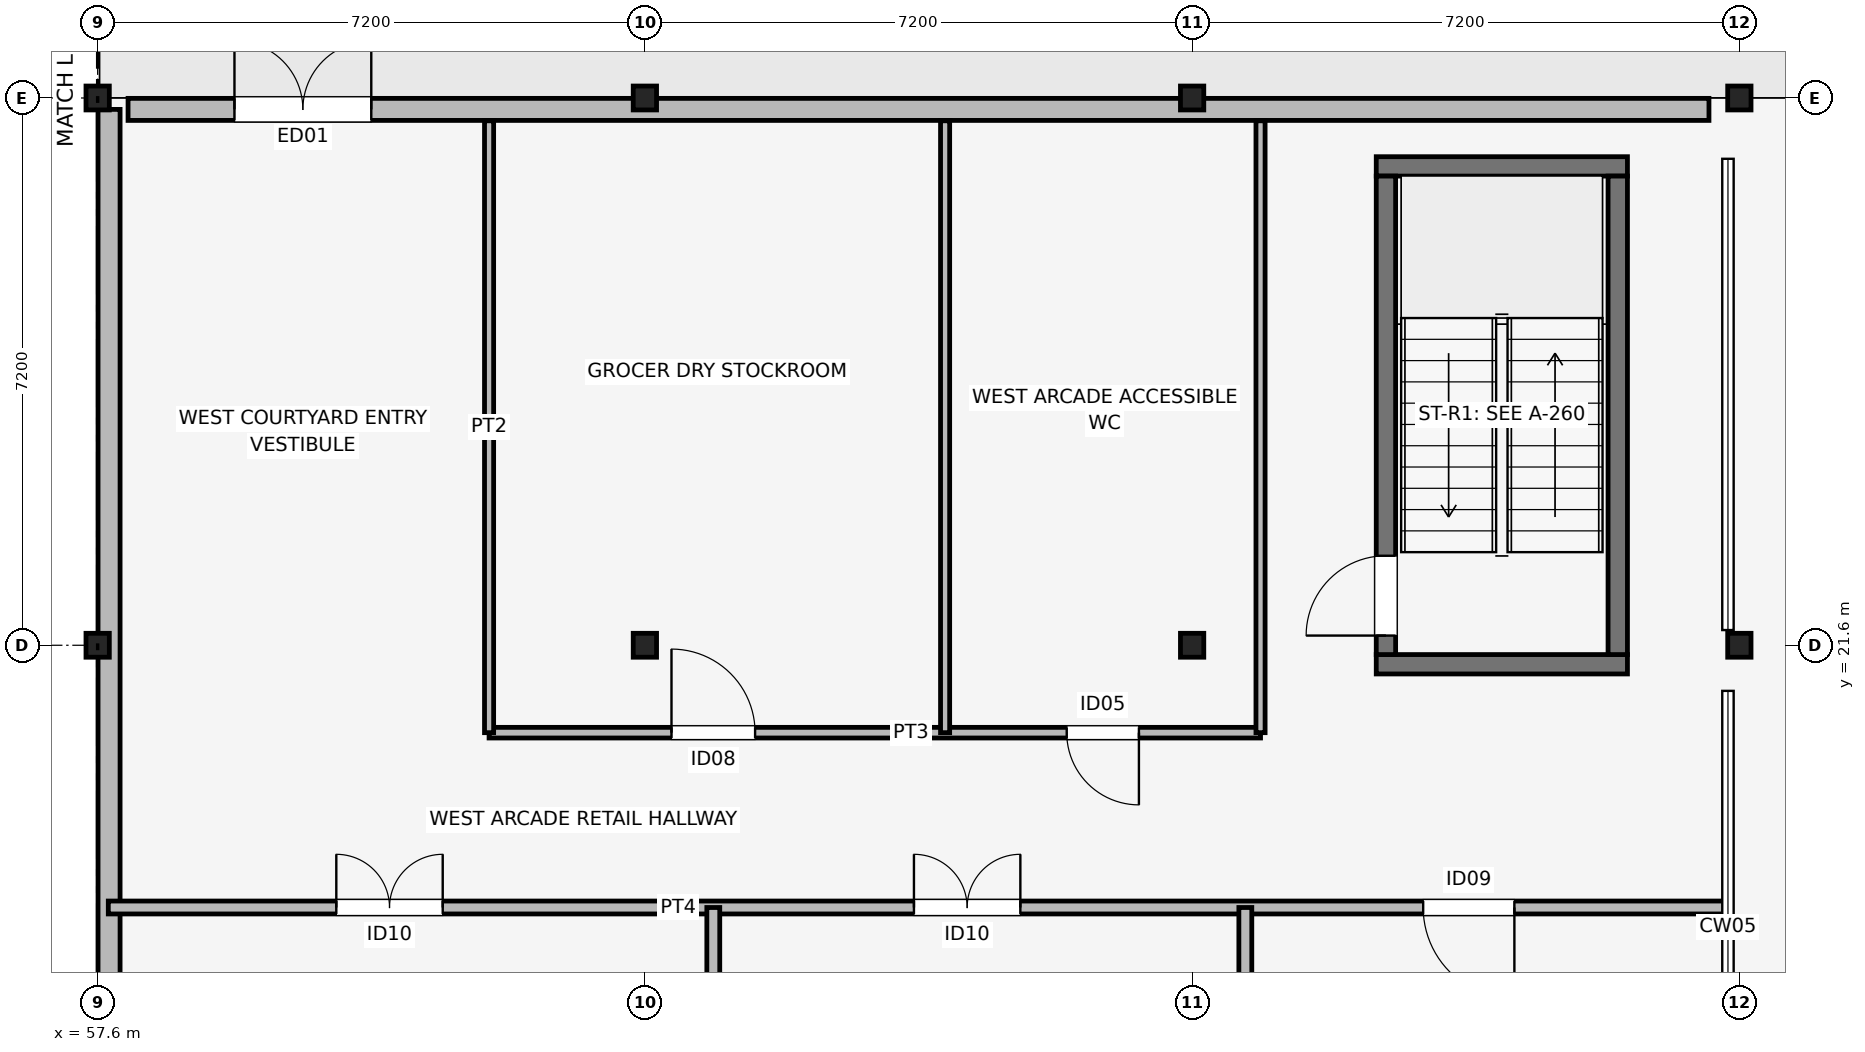
"""IFC4 building model, lengths in metres.
Left out: names, types, materials, properties, quantities, classifications, styles, units other than length and angle.
Written with IfcOpenShell. Run it as: python <this file> out.ifc"""

import sys

from ifc_helpers import new_model, si_unit, direction, frame, frame_2d, origin, origin_2d, place, context, subcontext, project, spatial, rectangle, i_section, extrude, element, fill, save


model = new_model("IFC4")
c1 = context("Model", 3, precision=1e-05, world=origin(), true_north=direction((0.0, 1.0)))
c2 = subcontext(c1, "Body", "Model", "MODEL_VIEW")
j1 = project(units=[si_unit("LENGTHUNIT", "METRE"), si_unit("PLANEANGLEUNIT", "RADIAN")], contexts=[c1])
p1 = place(None, origin())
s1 = spatial("IfcSite", under=j1, at=p1, CompositionType="ELEMENT")
p2 = place(p1, origin())
s2 = spatial("IfcBuilding", under=s1, at=p2, CompositionType="ELEMENT")
p3 = place(p2, origin())
s3 = spatial("IfcBuildingStorey", under=s2, at=p3, CompositionType="ELEMENT", Elevation=0.0)
for number, where, z_axis, x_axis in (
    (1, (57.6, 21.6, 0.0), (0.0, 0.0, 1.0), (1.0, 0.0, 0.0)),
    (2, (57.6, 28.8, 0.0), (0.0, 0.0, 1.0), (1.0, 0.0, 0.0)),
    (3, (64.8, 21.6, 0.0), (0.0, 0.0, 1.0), (1.0, 0.0, 0.0)),
    (4, (64.8, 28.8, 0.0), (0.0, 0.0, 1.0), (1.0, 0.0, 0.0)),
    (5, (72.0, 21.6, 0.0), (0.0, 0.0, 1.0), (1.0, 0.0, 0.0)),
    (6, (72.0, 28.8, 0.0), (0.0, 0.0, 1.0), (1.0, 0.0, 0.0)),
    (7, (79.2, 21.6, 0.0), (0.0, 0.0, 1.0), (1.0, 0.0, 0.0)),
    (8, (79.2, 28.8, 0.0), (0.0, 0.0, 1.0), (1.0, 0.0, 0.0)),
):
    element("IfcColumn", number, at=place(p3, frame(where, z_axis=z_axis, x_axis=x_axis)), inside=s3, PredefinedType="COLUMN", context=c2, shape_type="SweptSolid", body=[
        extrude(i_section(OverallWidth=0.307, OverallDepth=0.315, WebThickness=0.012, FlangeThickness=0.019, FilletRadius=0.017, at=origin_2d()), origin(), (0.0, 0.0, 1.0), 4.5),
    ])
for number, where, z_axis, x_axis in (
    (9, (74.423, 21.35, 0.0), (0.0, 0.0, 1.0), (1.0, 0.0, 0.0)),
    (10, (74.423, 27.9, 0.0), (0.0, 0.0, 1.0), (1.0, 0.0, 0.0)),
):
    element("IfcWall", number, at=place(p3, frame(where, z_axis=z_axis, x_axis=x_axis)), inside=s3, PredefinedType="SHEAR", context=c2, shape_type="SweptSolid", body=[
        extrude(rectangle(XDim=3.305, YDim=0.255, at=frame_2d((1.652, 0.0))), origin(), (0.0, 0.0, 1.0), 4.5),
    ])
p4 = place(p3, frame((74.55, 21.478, 0.0), z_axis=(0.0, 0.0, 1.0), x_axis=(0.0, 1.0, 0.0)))
e11 = element("IfcWall", 11, at=p4, inside=s3, PredefinedType="SHEAR", context=c2, shape_type="SweptSolid", body=[
    extrude(rectangle(XDim=6.295, YDim=0.255, at=frame_2d((3.147, 0.0))), origin(), (0.0, 0.0, 1.0), 4.5),
])
p5 = place(p4, frame((0.25, 0.0, 0.0)))
e12 = element("IfcOpeningElement", 12, at=p5, cuts=e11, PredefinedType="OPENING", context=c2, shape_type="SweptSolid", body=[
    extrude(rectangle(XDim=1.05, YDim=2.12, at=frame_2d((0.525, 1.06))), frame((0.0, 0.137, 0.0), z_axis=(0.0, -1.0, 0.0), x_axis=(1.0, 0.0, 0.0)), (0.0, 0.0, 1.0), 0.275),
])
p6 = place(p3, frame((77.6, 21.478, 0.0), z_axis=(0.0, 0.0, 1.0), x_axis=(0.0, 1.0, 0.0)))
e13 = element("IfcWall", 13, at=p6, inside=s3, PredefinedType="SHEAR", context=c2, shape_type="SweptSolid", body=[
    extrude(rectangle(XDim=6.295, YDim=0.255, at=frame_2d((3.147, 0.0))), origin(), (0.0, 0.0, 1.0), 4.5),
])
p7 = place(p3, frame((58.0, 28.65, 0.0), z_axis=(0.0, 0.0, 1.0), x_axis=(1.0, 0.0, 0.0)))
e14 = element("IfcWall", 14, at=p7, inside=s3, PredefinedType="SOLIDWALL", context=c2, shape_type="SweptSolid", body=[
    extrude(rectangle(XDim=20.8, YDim=0.29, at=frame_2d((10.4, 0.0))), origin(), (0.0, 0.0, 1.0), 3.701),
])
p8 = place(p7, frame((1.4, 0.0, 0.0)))
e15 = element("IfcOpeningElement", 15, at=p8, cuts=e14, PredefinedType="OPENING", context=c2, shape_type="SweptSolid", body=[
    extrude(rectangle(XDim=1.8, YDim=2.4, at=frame_2d((0.9, 1.2))), frame((0.0, 0.155, 0.0), z_axis=(0.0, -1.0, 0.0), x_axis=(1.0, 0.0, 0.0)), (0.0, 0.0, 1.0), 0.31),
])
p9 = place(p3, frame((57.75, 7.35, 0.0), z_axis=(0.0, 0.0, 1.0), x_axis=(0.0, 1.0, 0.0)))
e16 = element("IfcWall", 16, at=p9, inside=s3, PredefinedType="SOLIDWALL", context=c2, shape_type="SweptSolid", body=[
    extrude(rectangle(XDim=21.3, YDim=0.29, at=frame_2d((10.65, 0.0))), origin(), (0.0, 0.0, 1.0), 2.752),
])
p10 = place(p3, frame((57.74, 18.15, 0.0), z_axis=(0.0, 0.0, 1.0), x_axis=(1.0, 0.0, 0.0)))
e17 = element("IfcWall", 17, at=p10, inside=s3, PredefinedType="PARTITIONING", context=c2, shape_type="SweptSolid", body=[
    extrude(rectangle(XDim=21.32, YDim=0.17, at=frame_2d((10.66, 0.0))), origin(), (0.0, 0.0, 1.0), 3.5),
])
p11 = place(p10, frame((3.0, 0.0, 0.0)))
e18 = element("IfcOpeningElement", 18, at=p11, cuts=e17, PredefinedType="OPENING", context=c2, shape_type="SweptSolid", body=[
    extrude(rectangle(XDim=1.4, YDim=2.22, at=frame_2d((0.7, 1.11))), frame((0.0, 0.095, 0.0), z_axis=(0.0, -1.0, 0.0), x_axis=(1.0, 0.0, 0.0)), (0.0, 0.0, 1.0), 0.19),
])
p12 = place(p10, frame((10.6, 0.0, 0.0)))
e19 = element("IfcOpeningElement", 19, at=p12, cuts=e17, PredefinedType="OPENING", context=c2, shape_type="SweptSolid", body=[
    extrude(rectangle(XDim=1.4, YDim=2.22, at=frame_2d((0.7, 1.11))), frame((0.0, 0.095, 0.0), z_axis=(0.0, -1.0, 0.0), x_axis=(1.0, 0.0, 0.0)), (0.0, 0.0, 1.0), 0.19),
])
p13 = place(p10, frame((18.5, 0.0, 0.0), z_axis=(0.0, 0.0, 1.0), x_axis=(-1.0, 0.0, 0.0)))
e20 = element("IfcOpeningElement", 20, at=p13, cuts=e17, PredefinedType="OPENING", context=c2, shape_type="SweptSolid", body=[
    extrude(rectangle(XDim=1.2, YDim=2.18, at=frame_2d((0.6, 1.09))), frame((0.0, 0.095, 0.0), z_axis=(0.0, -1.0, 0.0), x_axis=(1.0, 0.0, 0.0)), (0.0, 0.0, 1.0), 0.19),
])
for number, where, z_axis, x_axis in (
    (21, (65.7, 7.5, 0.0), (0.0, 0.0, 1.0), (0.0, 1.0, 0.0)),
    (22, (72.7, 7.5, 0.0), (0.0, 0.0, 1.0), (0.0, 1.0, 0.0)),
):
    element("IfcWall", number, at=place(p3, frame(where, z_axis=z_axis, x_axis=x_axis)), inside=s3, PredefinedType="PARTITIONING", context=c2, shape_type="SweptSolid", body=[
        extrude(rectangle(XDim=10.65, YDim=0.17, at=frame_2d((5.325, 0.0))), origin(), (0.0, 0.0, 1.0), 3.5),
    ])
p14 = place(p3, frame((62.75, 20.45, 0.0), z_axis=(0.0, 0.0, 1.0), x_axis=(1.0, 0.0, 0.0)))
e23 = element("IfcWall", 23, at=p14, inside=s3, PredefinedType="PARTITIONING", context=c2, shape_type="SweptSolid", body=[
    extrude(rectangle(XDim=10.15, YDim=0.14, at=frame_2d((5.075, 0.0))), origin(), (0.0, 0.0, 1.0), 3.5),
])
p15 = place(p14, frame((2.4, 0.0, 0.0)))
e24 = element("IfcOpeningElement", 24, at=p15, cuts=e23, PredefinedType="OPENING", context=c2, shape_type="SweptSolid", body=[
    extrude(rectangle(XDim=1.1, YDim=2.15, at=frame_2d((0.55, 1.075))), frame((0.0, 0.08, 0.0), z_axis=(0.0, -1.0, 0.0), x_axis=(1.0, 0.0, 0.0)), (0.0, 0.0, 1.0), 0.16),
])
p16 = place(p14, frame((8.55, 0.0, 0.0), z_axis=(0.0, 0.0, 1.0), x_axis=(-1.0, 0.0, 0.0)))
e25 = element("IfcOpeningElement", 25, at=p16, cuts=e23, PredefinedType="OPENING", context=c2, shape_type="SweptSolid", body=[
    extrude(rectangle(XDim=0.95, YDim=2.12, at=frame_2d((0.475, 1.06))), frame((0.0, 0.08, 0.0), z_axis=(0.0, -1.0, 0.0), x_axis=(1.0, 0.0, 0.0)), (0.0, 0.0, 1.0), 0.16),
])
for number, where, z_axis, x_axis in (
    (26, (62.75, 20.45, 0.0), (0.0, 0.0, 1.0), (0.0, 1.0, 0.0)),
    (27, (68.75, 20.45, 0.0), (0.0, 0.0, 1.0), (0.0, 1.0, 0.0)),
    (28, (72.9, 20.45, 0.0), (0.0, 0.0, 1.0), (0.0, 1.0, 0.0)),
):
    element("IfcWall", number, at=place(p3, frame(where, z_axis=z_axis, x_axis=x_axis)), inside=s3, PredefinedType="PARTITIONING", context=c2, shape_type="SweptSolid", body=[
        extrude(rectangle(XDim=8.05, YDim=0.12, at=frame_2d((4.025, 0.0))), origin(), (0.0, 0.0, 1.0), 3.5),
    ])
p17 = place(p8, origin())
e29 = element("IfcDoor", 29, at=p17, inside=s3, OperationType="DOUBLE_DOOR_SINGLE_SWING", PredefinedType="DOOR", context=c2, shape_type="SweptSolid", body=[
    extrude(rectangle(XDim=1.8, YDim=2.4, at=frame_2d((0.9, 1.2))), frame((0.0, 0.025, 0.0), z_axis=(0.0, -1.0, 0.0), x_axis=(1.0, 0.0, 0.0)), (0.0, 0.0, 1.0), 0.05),
])
fill(e15, e29)
p18 = place(p11, origin())
e30 = element("IfcDoor", 30, at=p18, inside=s3, OperationType="DOUBLE_DOOR_SINGLE_SWING", PredefinedType="DOOR", context=c2, shape_type="SweptSolid", body=[
    extrude(rectangle(XDim=1.4, YDim=2.22, at=frame_2d((0.7, 1.11))), frame((0.0, 0.025, 0.0), z_axis=(0.0, -1.0, 0.0), x_axis=(1.0, 0.0, 0.0)), (0.0, 0.0, 1.0), 0.05),
])
fill(e18, e30)
p19 = place(p12, origin())
e31 = element("IfcDoor", 31, at=p19, inside=s3, OperationType="DOUBLE_DOOR_SINGLE_SWING", PredefinedType="DOOR", context=c2, shape_type="SweptSolid", body=[
    extrude(rectangle(XDim=1.4, YDim=2.22, at=frame_2d((0.7, 1.11))), frame((0.0, 0.025, 0.0), z_axis=(0.0, -1.0, 0.0), x_axis=(1.0, 0.0, 0.0)), (0.0, 0.0, 1.0), 0.05),
])
fill(e19, e31)
p20 = place(p13, origin())
e32 = element("IfcDoor", 32, at=p20, inside=s3, OperationType="SINGLE_SWING_RIGHT", PredefinedType="DOOR", context=c2, shape_type="SweptSolid", body=[
    extrude(rectangle(XDim=1.2, YDim=2.18, at=frame_2d((0.6, 1.09))), frame((0.0, 0.025, 0.0), z_axis=(0.0, -1.0, 0.0), x_axis=(1.0, 0.0, 0.0)), (0.0, 0.0, 1.0), 0.05),
])
fill(e20, e32)
p21 = place(p15, origin())
e33 = element("IfcDoor", 33, at=p21, inside=s3, OperationType="SINGLE_SWING_LEFT", PredefinedType="DOOR", context=c2, shape_type="SweptSolid", body=[
    extrude(rectangle(XDim=1.1, YDim=2.15, at=frame_2d((0.55, 1.075))), frame((0.0, 0.025, 0.0), z_axis=(0.0, -1.0, 0.0), x_axis=(1.0, 0.0, 0.0)), (0.0, 0.0, 1.0), 0.05),
])
fill(e24, e33)
p22 = place(p16, origin())
e34 = element("IfcDoor", 34, at=p22, inside=s3, OperationType="SINGLE_SWING_RIGHT", PredefinedType="DOOR", context=c2, shape_type="SweptSolid", body=[
    extrude(rectangle(XDim=0.95, YDim=2.12, at=frame_2d((0.475, 1.06))), frame((0.0, 0.025, 0.0), z_axis=(0.0, -1.0, 0.0), x_axis=(1.0, 0.0, 0.0)), (0.0, 0.0, 1.0), 0.05),
])
fill(e25, e34)
p23 = place(p5, origin())
e35 = element("IfcDoor", 35, at=p23, inside=s3, OperationType="SINGLE_SWING_LEFT", PredefinedType="DOOR", context=c2, shape_type="SweptSolid", body=[
    extrude(rectangle(XDim=1.05, YDim=2.12, at=frame_2d((0.525, 1.06))), frame((0.0, 0.025, 0.0), z_axis=(0.0, -1.0, 0.0), x_axis=(1.0, 0.0, 0.0)), (0.0, 0.0, 1.0), 0.05),
])
fill(e12, e35)
save(model, sys.argv[1])
